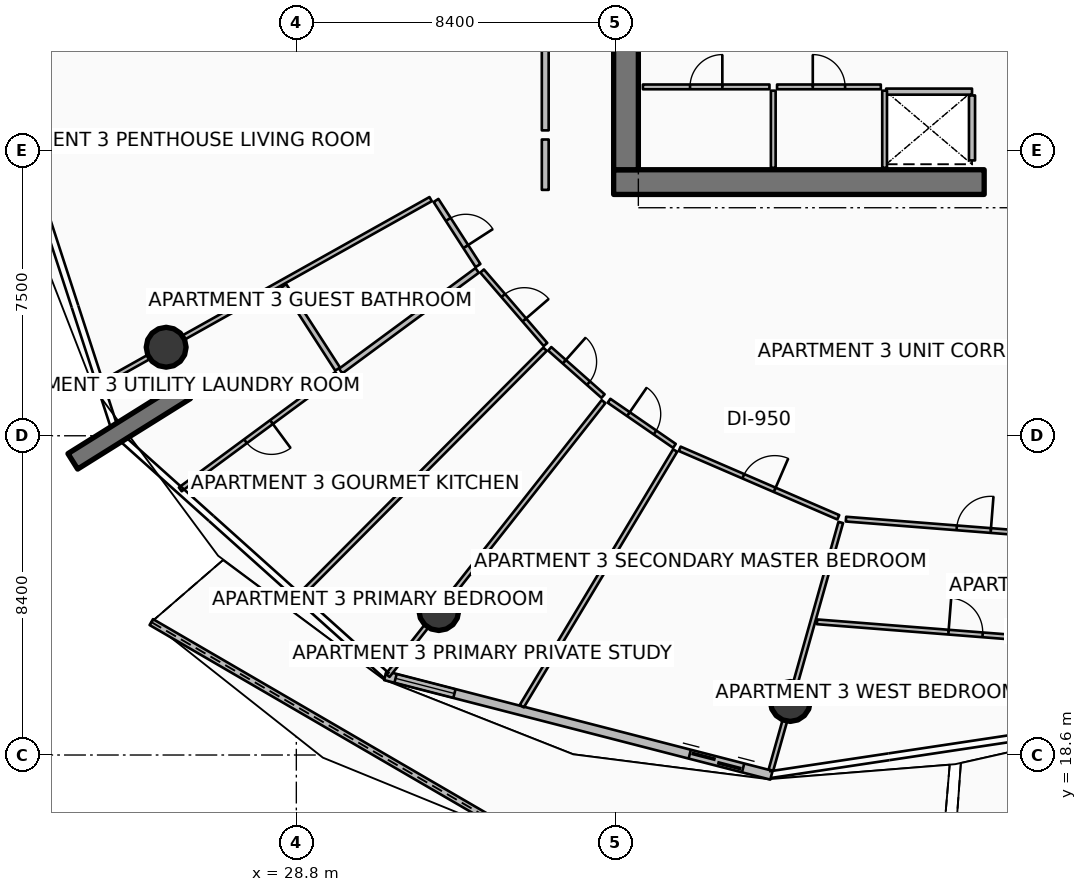
"""IFC4 building model, lengths in metres.
Left out: names, types, materials, properties, quantities, classifications, styles, units other than length and angle.
Written with IfcOpenShell. Run it as: python <this file> out.ifc"""

import sys

from ifc_helpers import new_model, si_unit, direction, frame, frame_2d, origin, origin_2d, place, context, subcontext, project, spatial, polyline, rectangle, circle, outline, extrude, element, fill, save


model = new_model("IFC4")
c1 = context("Model", 3, precision=1e-05, world=origin(), true_north=direction((0.0, 1.0)))
c2 = subcontext(c1, "Body", "Model", "MODEL_VIEW")
j1 = project(units=[si_unit("LENGTHUNIT", "METRE"), si_unit("PLANEANGLEUNIT", "RADIAN")], contexts=[c1])
p1 = place(None, origin())
s1 = spatial("IfcSite", under=j1, at=p1, CompositionType="ELEMENT")
p2 = place(p1, origin())
s2 = spatial("IfcBuilding", under=s1, at=p2, CompositionType="ELEMENT")
p3 = place(p2, frame((0.0, 0.0, 210.3)))
s3 = spatial("IfcBuildingStorey", under=s2, at=p3, CompositionType="ELEMENT", Elevation=210.3)
p4 = place(p3, frame((37.15, 33.675, 0.0), z_axis=(0.0, 0.0, 1.0), x_axis=(1.0, 0.0, 0.0)))
e1 = element("IfcWall", 1, at=p4, inside=s3, PredefinedType="SHEAR", context=c2, shape_type="SweptSolid", body=[
    extrude(rectangle(XDim=9.75, YDim=0.65, at=frame_2d((4.875, 0.0))), origin(), (0.0, 0.0, 1.0), 3.75),
])
p5 = place(p3, frame((37.475, 34.0, 0.0), z_axis=(0.0, 0.0, 1.0), x_axis=(0.0, 1.0, 0.0)))
e2 = element("IfcWall", 2, at=p5, inside=s3, PredefinedType="SHEAR", context=c2, shape_type="SweptSolid", body=[
    extrude(rectangle(XDim=16.0, YDim=0.65, at=frame_2d((8.0, 0.0))), origin(), (0.0, 0.0, 1.0), 3.75),
])
p6 = place(p3, frame((25.886, 28.182, 0.0), z_axis=(0.0, 0.0, 1.0), x_axis=(-0.848033572426, -0.529942506352, 0.0)))
e3 = element("IfcWall", 3, at=p6, inside=s3, PredefinedType="SOLIDWALL", context=c2, shape_type="SweptSolid", body=[
    extrude(rectangle(XDim=3.5, YDim=0.48, at=frame_2d((1.75, 0.0))), origin(), (0.0, 0.0, 1.0), 3.75),
])
for number, where, z_axis, x_axis in (
    (4, (25.375, 29.329, 0.0), (0.0, 0.0, 1.0), (1.0, 0.0, 0.0)),
    (5, (32.549, 22.401, 0.0), (0.0, 0.0, 1.0), (1.0, 0.0, 0.0)),
    (6, (41.798, 20.008, 0.0), (0.0, 0.0, 1.0), (1.0, 0.0, 0.0)),
):
    element("IfcColumn", number, at=place(p3, frame(where, z_axis=z_axis, x_axis=x_axis)), inside=s3, PredefinedType="COLUMN", context=c2, shape_type="SweptSolid", body=[
        extrude(circle(Radius=0.525, at=origin_2d()), origin(), (0.0, 0.0, 1.0), 3.5),
    ])
p7 = place(p3, frame((24.984, 22.098, 0.0), z_axis=(0.0, 0.0, 1.0), x_axis=(0.864391947404, -0.502818616663, 0.0)))
e7 = element("IfcWall", 7, at=p7, inside=s3, PredefinedType="PARAPET", context=c2, shape_type="SweptSolid", body=[
    extrude(outline(polyline([(0.0, 0.0), (11.37, 0.0), (11.37, 1.832), (5.685, 1.853), (0.0, 1.756), (0.0, 0.0)])), frame((0.0, 0.09, 0.0), z_axis=(0.0, -1.0, 0.0), x_axis=(1.0, 0.0, 0.0)), (0.0, 0.0, 1.0), 0.18),
])
p8 = place(p3, frame((46.135, 16.298, 0.0), z_axis=(0.0, 0.0, 1.0), x_axis=(0.956822857871, 0.290671668135, 0.0)))
e8 = element("IfcWall", 8, at=p8, inside=s3, PredefinedType="PARAPET", context=c2, shape_type="SweptSolid", body=[
    extrude(outline(polyline([(0.0, 0.0), (9.598, 0.0), (9.598, 1.148), (4.799, 1.284), (0.0, 1.483), (0.0, 0.0)])), frame((0.0, 0.09, 0.0), z_axis=(0.0, -1.0, 0.0), x_axis=(1.0, 0.0, 0.0)), (0.0, 0.0, 1.0), 0.18),
])
p9 = place(p3, frame((31.14, 20.687, 0.0), z_axis=(0.0, 0.0, 1.0), x_axis=(0.968374028006, -0.249502989727, 0.0)))
e9 = element("IfcWall", 9, at=p9, inside=s3, PredefinedType="SOLIDWALL", context=c2, shape_type="SweptSolid", body=[
    extrude(rectangle(XDim=10.494, YDim=0.24, at=frame_2d((5.247, 0.0))), origin(), (0.0, 0.0, 1.0), 2.45),
])
p10 = place(p9, frame((8.274, 0.0, 0.0)))
e10 = element("IfcOpeningElement", 10, at=p10, cuts=e9, PredefinedType="OPENING", context=c2, shape_type="SweptSolid", body=[
    extrude(rectangle(XDim=1.45, YDim=2.15, at=frame_2d((0.725, 1.075))), frame((0.0, 0.13, 0.0), z_axis=(0.0, -1.0, 0.0), x_axis=(1.0, 0.0, 0.0)), (0.0, 0.0, 1.0), 0.26),
])
p11 = place(p9, frame((0.28, 0.0, 0.65)))
e11 = element("IfcOpeningElement", 11, at=p11, cuts=e9, PredefinedType="OPENING", context=c2, shape_type="SweptSolid", body=[
    extrude(rectangle(XDim=1.6, YDim=1.5, at=frame_2d((0.8, 0.75))), frame((0.0, 0.13, 0.0), z_axis=(0.0, -1.0, 0.0), x_axis=(1.0, 0.0, 0.0)), (0.0, 0.0, 1.0), 0.26),
])
p12 = place(p3, frame((44.32, 36.055, 0.0), z_axis=(0.0, 0.0, 1.0), x_axis=(1.0, 0.0, 0.0)))
e12 = element("IfcWall", 12, at=p12, inside=s3, PredefinedType="PARTITIONING", context=c2, shape_type="SweptSolid", body=[
    extrude(rectangle(XDim=2.26, YDim=0.16, at=frame_2d((1.13, 0.0))), origin(), (0.0, 0.0, 1.0), 3.5),
])
p13 = place(p3, frame((46.58, 34.245, 0.0), z_axis=(0.0, 0.0, 1.0), x_axis=(0.0, 1.0, 0.0)))
e13 = element("IfcWall", 13, at=p13, inside=s3, PredefinedType="PARTITIONING", context=c2, shape_type="SweptSolid", body=[
    extrude(rectangle(XDim=1.71, YDim=0.16, at=frame_2d((0.855, 0.0))), origin(), (0.0, 0.0, 1.0), 3.5),
])
for number, where, z_axis, x_axis in (
    (14, (44.28, 34.05, 0.0), (0.0, 0.0, 1.0), (0.0, 1.0, 0.0)),
    (15, (41.35, 34.05, 0.0), (0.0, 0.0, 1.0), (0.0, 1.0, 0.0)),
):
    element("IfcWall", number, at=place(p3, frame(where, z_axis=z_axis, x_axis=x_axis)), inside=s3, PredefinedType="PARTITIONING", context=c2, shape_type="SweptSolid", body=[
        extrude(rectangle(XDim=2.03, YDim=0.125, at=frame_2d((1.015, 0.0))), origin(), (0.0, 0.0, 1.0), 2.94),
    ])
p14 = place(p3, frame((37.92, 36.18, 0.0), z_axis=(0.0, 0.0, 1.0), x_axis=(1.0, 0.0, 0.0)))
e16 = element("IfcWall", 16, at=p14, inside=s3, PredefinedType="PARTITIONING", context=c2, shape_type="SweptSolid", body=[
    extrude(rectangle(XDim=3.33, YDim=0.125, at=frame_2d((1.665, 0.0))), origin(), (0.0, 0.0, 1.0), 2.94),
])
p15 = place(p14, frame((1.24, 0.0, 0.0)))
e17 = element("IfcOpeningElement", 17, at=p15, cuts=e16, PredefinedType="OPENING", context=c2, shape_type="SweptSolid", body=[
    extrude(rectangle(XDim=0.85, YDim=2.06, at=frame_2d((0.425, 1.03))), frame((0.0, 0.073, 0.0), z_axis=(0.0, -1.0, 0.0), x_axis=(1.0, 0.0, 0.0)), (0.0, 0.0, 1.0), 0.145),
])
p16 = place(p3, frame((41.45, 36.18, 0.0), z_axis=(0.0, 0.0, 1.0), x_axis=(1.0, 0.0, 0.0)))
e18 = element("IfcWall", 18, at=p16, inside=s3, PredefinedType="PARTITIONING", context=c2, shape_type="SweptSolid", body=[
    extrude(rectangle(XDim=2.73, YDim=0.125, at=frame_2d((1.365, 0.0))), origin(), (0.0, 0.0, 1.0), 2.94),
])
p17 = place(p16, frame((0.94, 0.0, 0.0)))
e19 = element("IfcOpeningElement", 19, at=p17, cuts=e18, PredefinedType="OPENING", context=c2, shape_type="SweptSolid", body=[
    extrude(rectangle(XDim=0.85, YDim=2.06, at=frame_2d((0.425, 1.03))), frame((0.0, 0.073, 0.0), z_axis=(0.0, -1.0, 0.0), x_axis=(1.0, 0.0, 0.0)), (0.0, 0.0, 1.0), 0.145),
])
p18 = place(p3, frame((35.35, 40.383, 0.0), z_axis=(0.0, 0.0, 1.0), x_axis=(0.0, -1.0, 0.0)))
e20 = element("IfcWall", 20, at=p18, inside=s3, PredefinedType="PARTITIONING", context=c2, shape_type="SweptSolid", body=[
    extrude(rectangle(XDim=5.347, YDim=0.18, at=frame_2d((2.674, 0.0))), origin(), (0.0, 0.0, 1.0), 2.94),
])
p19 = place(p18, frame((2.124, 0.0, 0.0)))
e21 = element("IfcOpeningElement", 21, at=p19, cuts=e20, PredefinedType="OPENING", context=c2, shape_type="SweptSolid", body=[
    extrude(rectangle(XDim=1.1, YDim=2.1, at=frame_2d((0.55, 1.05))), frame((0.0, 0.1, 0.0), z_axis=(0.0, -1.0, 0.0), x_axis=(1.0, 0.0, 0.0)), (0.0, 0.0, 1.0), 0.2),
])
p20 = place(p3, frame((35.35, 34.796, 0.0), z_axis=(0.0, 0.0, 1.0), x_axis=(0.0, -1.0, 0.0)))
e22 = element("IfcWall", 22, at=p20, inside=s3, PredefinedType="PARTITIONING", context=c2, shape_type="SweptSolid", body=[
    extrude(rectangle(XDim=1.326, YDim=0.18, at=frame_2d((0.663, 0.0))), origin(), (0.0, 0.0, 1.0), 2.94),
])
p21 = place(p3, frame((32.334, 33.227, 0.0), z_axis=(0.0, 0.0, 1.0), x_axis=(-0.872500152392, -0.488613839424, 0.0)))
e23 = element("IfcWall", 23, at=p21, inside=s3, PredefinedType="PARTITIONING", context=c2, shape_type="SweptSolid", body=[
    extrude(rectangle(XDim=9.94, YDim=0.125, at=frame_2d((4.97, 0.0))), origin(), (0.0, 0.0, 1.0), 2.94),
])
p22 = place(p3, frame((32.476, 33.192, 0.0), z_axis=(0.0, 0.0, 1.0), x_axis=(0.542143239932, -0.840286086637, 0.0)))
e24 = element("IfcWall", 24, at=p22, inside=s3, PredefinedType="PARTITIONING", context=c2, shape_type="SweptSolid", body=[
    extrude(rectangle(XDim=2.038, YDim=0.15, at=frame_2d((1.019, 0.0))), origin(), (0.0, 0.0, 1.0), 2.94),
])
p23 = place(p22, frame((0.594, 0.0, 0.0)))
e25 = element("IfcOpeningElement", 25, at=p23, cuts=e24, PredefinedType="OPENING", context=c2, shape_type="SweptSolid", body=[
    extrude(rectangle(XDim=0.85, YDim=2.06, at=frame_2d((0.425, 1.03))), frame((0.0, 0.085, 0.0), z_axis=(0.0, -1.0, 0.0), x_axis=(1.0, 0.0, 0.0)), (0.0, 0.0, 1.0), 0.17),
])
p24 = place(p3, frame((28.471, 30.949, 0.0), z_axis=(0.0, 0.0, 1.0), x_axis=(0.542080018781, -0.840326872853, 0.0)))
e26 = element("IfcWall", 26, at=p24, inside=s3, PredefinedType="PARTITIONING", context=c2, shape_type="SweptSolid", body=[
    extrude(rectangle(XDim=2.611, YDim=0.15, at=frame_2d((1.306, 0.0))), origin(), (0.0, 0.0, 1.0), 2.94),
])
p25 = place(p3, frame((33.557, 31.35, 0.0), z_axis=(0.0, 0.0, 1.0), x_axis=(-0.804841149106, -0.593490290322, 0.0)))
e27 = element("IfcWall", 27, at=p25, inside=s3, PredefinedType="PARTITIONING", context=c2, shape_type="SweptSolid", body=[
    extrude(rectangle(XDim=4.46, YDim=0.15, at=frame_2d((2.23, 0.0))), origin(), (0.0, 0.0, 1.0), 2.94),
])
p26 = place(p3, frame((29.863, 28.626, 0.0), z_axis=(0.0, 0.0, 1.0), x_axis=(-0.804842237675, -0.593488814094, 0.0)))
e28 = element("IfcWall", 28, at=p26, inside=s3, PredefinedType="PARTITIONING", context=c2, shape_type="SweptSolid", body=[
    extrude(rectangle(XDim=5.115, YDim=0.125, at=frame_2d((2.558, 0.0))), origin(), (0.0, 0.0, 1.0), 2.94),
])
p27 = place(p26, frame((2.133, 0.0, 0.0)))
e29 = element("IfcOpeningElement", 29, at=p27, cuts=e28, PredefinedType="OPENING", context=c2, shape_type="SweptSolid", body=[
    extrude(rectangle(XDim=0.85, YDim=2.06, at=frame_2d((0.425, 1.03))), frame((0.0, 0.073, 0.0), z_axis=(0.0, -1.0, 0.0), x_axis=(1.0, 0.0, 0.0)), (0.0, 0.0, 1.0), 0.145),
])
p28 = place(p3, frame((35.344, 29.277, 0.0), z_axis=(0.0, 0.0, 1.0), x_axis=(-0.705226489462, -0.708982086206, 0.0)))
e30 = element("IfcWall", 30, at=p28, inside=s3, PredefinedType="PARTITIONING", context=c2, shape_type="SweptSolid", body=[
    extrude(rectangle(XDim=9.166, YDim=0.125, at=frame_2d((4.583, 0.0))), origin(), (0.0, 0.0, 1.0), 2.94),
])
p29 = place(p3, frame((33.688, 31.335, 0.0), z_axis=(0.0, 0.0, 1.0), x_axis=(0.653119308398, -0.757255022431, 0.0)))
e31 = element("IfcWall", 31, at=p29, inside=s3, PredefinedType="PARTITIONING", context=c2, shape_type="SweptSolid", body=[
    extrude(rectangle(XDim=2.553, YDim=0.125, at=frame_2d((1.277, 0.0))), origin(), (0.0, 0.0, 1.0), 2.94),
])
p30 = place(p29, frame((0.852, 0.0, 0.0)))
e32 = element("IfcOpeningElement", 32, at=p30, cuts=e31, PredefinedType="OPENING", context=c2, shape_type="SweptSolid", body=[
    extrude(rectangle(XDim=0.85, YDim=2.06, at=frame_2d((0.425, 1.03))), frame((0.0, 0.073, 0.0), z_axis=(0.0, -1.0, 0.0), x_axis=(1.0, 0.0, 0.0)), (0.0, 0.0, 1.0), 0.145),
])
p31 = place(p3, frame((35.468, 29.288, 0.0), z_axis=(0.0, 0.0, 1.0), x_axis=(0.748399816021, -0.663247853656, 0.0)))
e33 = element("IfcWall", 33, at=p31, inside=s3, PredefinedType="PARTITIONING", context=c2, shape_type="SweptSolid", body=[
    extrude(rectangle(XDim=1.875, YDim=0.125, at=frame_2d((0.938, 0.0))), origin(), (0.0, 0.0, 1.0), 2.94),
])
p32 = place(p31, frame((0.512, 0.0, 0.0)))
e34 = element("IfcOpeningElement", 34, at=p32, cuts=e33, PredefinedType="OPENING", context=c2, shape_type="SweptSolid", body=[
    extrude(rectangle(XDim=0.85, YDim=2.06, at=frame_2d((0.425, 1.03))), frame((0.0, 0.073, 0.0), z_axis=(0.0, -1.0, 0.0), x_axis=(1.0, 0.0, 0.0)), (0.0, 0.0, 1.0), 0.145),
])
p33 = place(p3, frame((36.884, 27.9, 0.0), z_axis=(0.0, 0.0, 1.0), x_axis=(-0.619094580594, -0.785316433216, 0.0)))
e35 = element("IfcWall", 35, at=p33, inside=s3, PredefinedType="PARTITIONING", context=c2, shape_type="SweptSolid", body=[
    extrude(rectangle(XDim=9.175, YDim=0.125, at=frame_2d((4.588, 0.0))), origin(), (0.0, 0.0, 1.0), 2.94),
])
p34 = place(p3, frame((38.768, 26.612, 0.0), z_axis=(0.0, 0.0, 1.0), x_axis=(-0.514431677275, -0.857531369348, 0.0)))
e36 = element("IfcWall", 36, at=p34, inside=s3, PredefinedType="PARTITIONING", context=c2, shape_type="SweptSolid", body=[
    extrude(rectangle(XDim=7.844, YDim=0.125, at=frame_2d((3.922, 0.0))), origin(), (0.0, 0.0, 1.0), 2.94),
])
p35 = place(p3, frame((37.028, 27.921, 0.0), z_axis=(0.0, 0.0, 1.0), x_axis=(0.823103592367, -0.567891253879, 0.0)))
e37 = element("IfcWall", 37, at=p35, inside=s3, PredefinedType="PARTITIONING", context=c2, shape_type="SweptSolid", body=[
    extrude(rectangle(XDim=2.09, YDim=0.125, at=frame_2d((1.045, 0.0))), origin(), (0.0, 0.0, 1.0), 2.94),
])
p36 = place(p35, frame((0.62, 0.0, 0.0)))
e38 = element("IfcOpeningElement", 38, at=p36, cuts=e37, PredefinedType="OPENING", context=c2, shape_type="SweptSolid", body=[
    extrude(rectangle(XDim=0.85, YDim=2.06, at=frame_2d((0.425, 1.03))), frame((0.0, 0.073, 0.0), z_axis=(0.0, -1.0, 0.0), x_axis=(1.0, 0.0, 0.0)), (0.0, 0.0, 1.0), 0.145),
])
p37 = place(p3, frame((38.888, 26.657, 0.0), z_axis=(0.0, 0.0, 1.0), x_axis=(0.918052580004, -0.396458648976, 0.0)))
e39 = element("IfcWall", 39, at=p37, inside=s3, PredefinedType="PARTITIONING", context=c2, shape_type="SweptSolid", body=[
    extrude(rectangle(XDim=4.546, YDim=0.125, at=frame_2d((2.273, 0.0))), origin(), (0.0, 0.0, 1.0), 2.94),
])
p38 = place(p37, frame((1.823, 0.0, 0.0)))
e40 = element("IfcOpeningElement", 40, at=p38, cuts=e39, PredefinedType="OPENING", context=c2, shape_type="SweptSolid", body=[
    extrude(rectangle(XDim=0.9, YDim=2.08, at=frame_2d((0.45, 1.04))), frame((0.0, 0.073, 0.0), z_axis=(0.0, -1.0, 0.0), x_axis=(1.0, 0.0, 0.0)), (0.0, 0.0, 1.0), 0.145),
])
p39 = place(p3, frame((43.126, 24.719, 0.0), z_axis=(0.0, 0.0, 1.0), x_axis=(-0.271429339147, -0.962458369931, 0.0)))
e41 = element("IfcWall", 41, at=p39, inside=s3, PredefinedType="PARTITIONING", context=c2, shape_type="SweptSolid", body=[
    extrude(rectangle(XDim=6.772, YDim=0.125, at=frame_2d((3.386, 0.0))), origin(), (0.0, 0.0, 1.0), 2.94),
])
p40 = place(p3, frame((43.263, 24.807, 0.0), z_axis=(0.0, 0.0, 1.0), x_axis=(0.996914936791, -0.078489545824, 0.0)))
e42 = element("IfcWall", 42, at=p40, inside=s3, PredefinedType="PARTITIONING", context=c2, shape_type="SweptSolid", body=[
    extrude(rectangle(XDim=6.747, YDim=0.125, at=frame_2d((3.373, 0.0))), origin(), (0.0, 0.0, 1.0), 2.94),
])
p41 = place(p40, frame((2.923, 0.0, 0.0)))
e43 = element("IfcOpeningElement", 43, at=p41, cuts=e42, PredefinedType="OPENING", context=c2, shape_type="SweptSolid", body=[
    extrude(rectangle(XDim=0.9, YDim=2.08, at=frame_2d((0.45, 1.04))), frame((0.0, 0.073, 0.0), z_axis=(0.0, -1.0, 0.0), x_axis=(1.0, 0.0, 0.0)), (0.0, 0.0, 1.0), 0.145),
])
p42 = place(p3, frame((42.501, 22.105, 0.0), z_axis=(0.0, 0.0, 1.0), x_axis=(0.996917595152, -0.078455774017, 0.0)))
e44 = element("IfcWall", 44, at=p42, inside=s3, PredefinedType="PARTITIONING", context=c2, shape_type="SweptSolid", body=[
    extrude(rectangle(XDim=7.842, YDim=0.125, at=frame_2d((3.921, 0.0))), origin(), (0.0, 0.0, 1.0), 2.94),
])
p43 = place(p42, frame((3.471, 0.0, 0.0)))
e45 = element("IfcOpeningElement", 45, at=p43, cuts=e44, PredefinedType="OPENING", context=c2, shape_type="SweptSolid", body=[
    extrude(rectangle(XDim=0.9, YDim=2.08, at=frame_2d((0.45, 1.04))), frame((0.0, 0.073, 0.0), z_axis=(0.0, -1.0, 0.0), x_axis=(1.0, 0.0, 0.0)), (0.0, 0.0, 1.0), 0.145),
])
p44 = place(p10, origin())
e46 = element("IfcDoor", 46, at=p44, inside=s3, OperationType="DOUBLE_DOOR_SLIDING", PredefinedType="DOOR", context=c2, shape_type="SweptSolid", body=[
    extrude(rectangle(XDim=1.45, YDim=2.15, at=frame_2d((0.725, 1.075))), frame((0.0, 0.025, 0.0), z_axis=(0.0, -1.0, 0.0), x_axis=(1.0, 0.0, 0.0)), (0.0, 0.0, 1.0), 0.05),
])
fill(e10, e46)
p45 = place(p11, origin())
e47 = element("IfcWindow", 47, at=p45, inside=s3, PartitioningType="SINGLE_PANEL", PredefinedType="WINDOW", context=c2, shape_type="SweptSolid", body=[
    extrude(rectangle(XDim=1.6, YDim=1.5, at=frame_2d((0.8, 0.75))), frame((0.0, 0.03, 0.0), z_axis=(0.0, -1.0, 0.0), x_axis=(1.0, 0.0, 0.0)), (0.0, 0.0, 1.0), 0.06),
])
fill(e11, e47)
p46 = place(p15, origin())
e48 = element("IfcDoor", 48, at=p46, inside=s3, OperationType="SINGLE_SWING_RIGHT", PredefinedType="DOOR", context=c2, shape_type="SweptSolid", body=[
    extrude(rectangle(XDim=0.85, YDim=2.06, at=frame_2d((0.425, 1.03))), frame((0.0, 0.025, 0.0), z_axis=(0.0, -1.0, 0.0), x_axis=(1.0, 0.0, 0.0)), (0.0, 0.0, 1.0), 0.05),
])
fill(e17, e48)
p47 = place(p17, origin())
e49 = element("IfcDoor", 49, at=p47, inside=s3, OperationType="SINGLE_SWING_LEFT", PredefinedType="DOOR", context=c2, shape_type="SweptSolid", body=[
    extrude(rectangle(XDim=0.85, YDim=2.06, at=frame_2d((0.425, 1.03))), frame((0.0, 0.025, 0.0), z_axis=(0.0, -1.0, 0.0), x_axis=(1.0, 0.0, 0.0)), (0.0, 0.0, 1.0), 0.05),
])
fill(e19, e49)
p48 = place(p23, origin())
e50 = element("IfcDoor", 50, at=p48, inside=s3, OperationType="SINGLE_SWING_RIGHT", PredefinedType="DOOR", context=c2, shape_type="SweptSolid", body=[
    extrude(rectangle(XDim=0.85, YDim=2.06, at=frame_2d((0.425, 1.03))), frame((0.0, 0.025, 0.0), z_axis=(0.0, -1.0, 0.0), x_axis=(1.0, 0.0, 0.0)), (0.0, 0.0, 1.0), 0.05),
])
fill(e25, e50)
p49 = place(p27, origin())
e51 = element("IfcDoor", 51, at=p49, inside=s3, OperationType="SINGLE_SWING_LEFT", PredefinedType="DOOR", context=c2, shape_type="SweptSolid", body=[
    extrude(rectangle(XDim=0.85, YDim=2.06, at=frame_2d((0.425, 1.03))), frame((0.0, 0.025, 0.0), z_axis=(0.0, -1.0, 0.0), x_axis=(1.0, 0.0, 0.0)), (0.0, 0.0, 1.0), 0.05),
])
fill(e29, e51)
p50 = place(p30, origin())
e52 = element("IfcDoor", 52, at=p50, inside=s3, OperationType="SINGLE_SWING_RIGHT", PredefinedType="DOOR", context=c2, shape_type="SweptSolid", body=[
    extrude(rectangle(XDim=0.85, YDim=2.06, at=frame_2d((0.425, 1.03))), frame((0.0, 0.025, 0.0), z_axis=(0.0, -1.0, 0.0), x_axis=(1.0, 0.0, 0.0)), (0.0, 0.0, 1.0), 0.05),
])
fill(e32, e52)
p51 = place(p32, origin())
e53 = element("IfcDoor", 53, at=p51, inside=s3, OperationType="SINGLE_SWING_LEFT", PredefinedType="DOOR", context=c2, shape_type="SweptSolid", body=[
    extrude(rectangle(XDim=0.85, YDim=2.06, at=frame_2d((0.425, 1.03))), frame((0.0, 0.025, 0.0), z_axis=(0.0, -1.0, 0.0), x_axis=(1.0, 0.0, 0.0)), (0.0, 0.0, 1.0), 0.05),
])
fill(e34, e53)
p52 = place(p36, origin())
e54 = element("IfcDoor", 54, at=p52, inside=s3, OperationType="SINGLE_SWING_LEFT", PredefinedType="DOOR", context=c2, shape_type="SweptSolid", body=[
    extrude(rectangle(XDim=0.85, YDim=2.06, at=frame_2d((0.425, 1.03))), frame((0.0, 0.025, 0.0), z_axis=(0.0, -1.0, 0.0), x_axis=(1.0, 0.0, 0.0)), (0.0, 0.0, 1.0), 0.05),
])
fill(e38, e54)
p53 = place(p38, origin())
e55 = element("IfcDoor", 55, at=p53, inside=s3, OperationType="SINGLE_SWING_RIGHT", PredefinedType="DOOR", context=c2, shape_type="SweptSolid", body=[
    extrude(rectangle(XDim=0.9, YDim=2.08, at=frame_2d((0.45, 1.04))), frame((0.0, 0.025, 0.0), z_axis=(0.0, -1.0, 0.0), x_axis=(1.0, 0.0, 0.0)), (0.0, 0.0, 1.0), 0.05),
])
fill(e40, e55)
p54 = place(p41, origin())
e56 = element("IfcDoor", 56, at=p54, inside=s3, OperationType="SINGLE_SWING_RIGHT", PredefinedType="DOOR", context=c2, shape_type="SweptSolid", body=[
    extrude(rectangle(XDim=0.9, YDim=2.08, at=frame_2d((0.45, 1.04))), frame((0.0, 0.025, 0.0), z_axis=(0.0, -1.0, 0.0), x_axis=(1.0, 0.0, 0.0)), (0.0, 0.0, 1.0), 0.05),
])
fill(e43, e56)
p55 = place(p43, origin())
e57 = element("IfcDoor", 57, at=p55, inside=s3, OperationType="SINGLE_SWING_LEFT", PredefinedType="DOOR", context=c2, shape_type="SweptSolid", body=[
    extrude(rectangle(XDim=0.9, YDim=2.08, at=frame_2d((0.45, 1.04))), frame((0.0, 0.025, 0.0), z_axis=(0.0, -1.0, 0.0), x_axis=(1.0, 0.0, 0.0)), (0.0, 0.0, 1.0), 0.05),
])
fill(e45, e57)
save(model, sys.argv[1])
